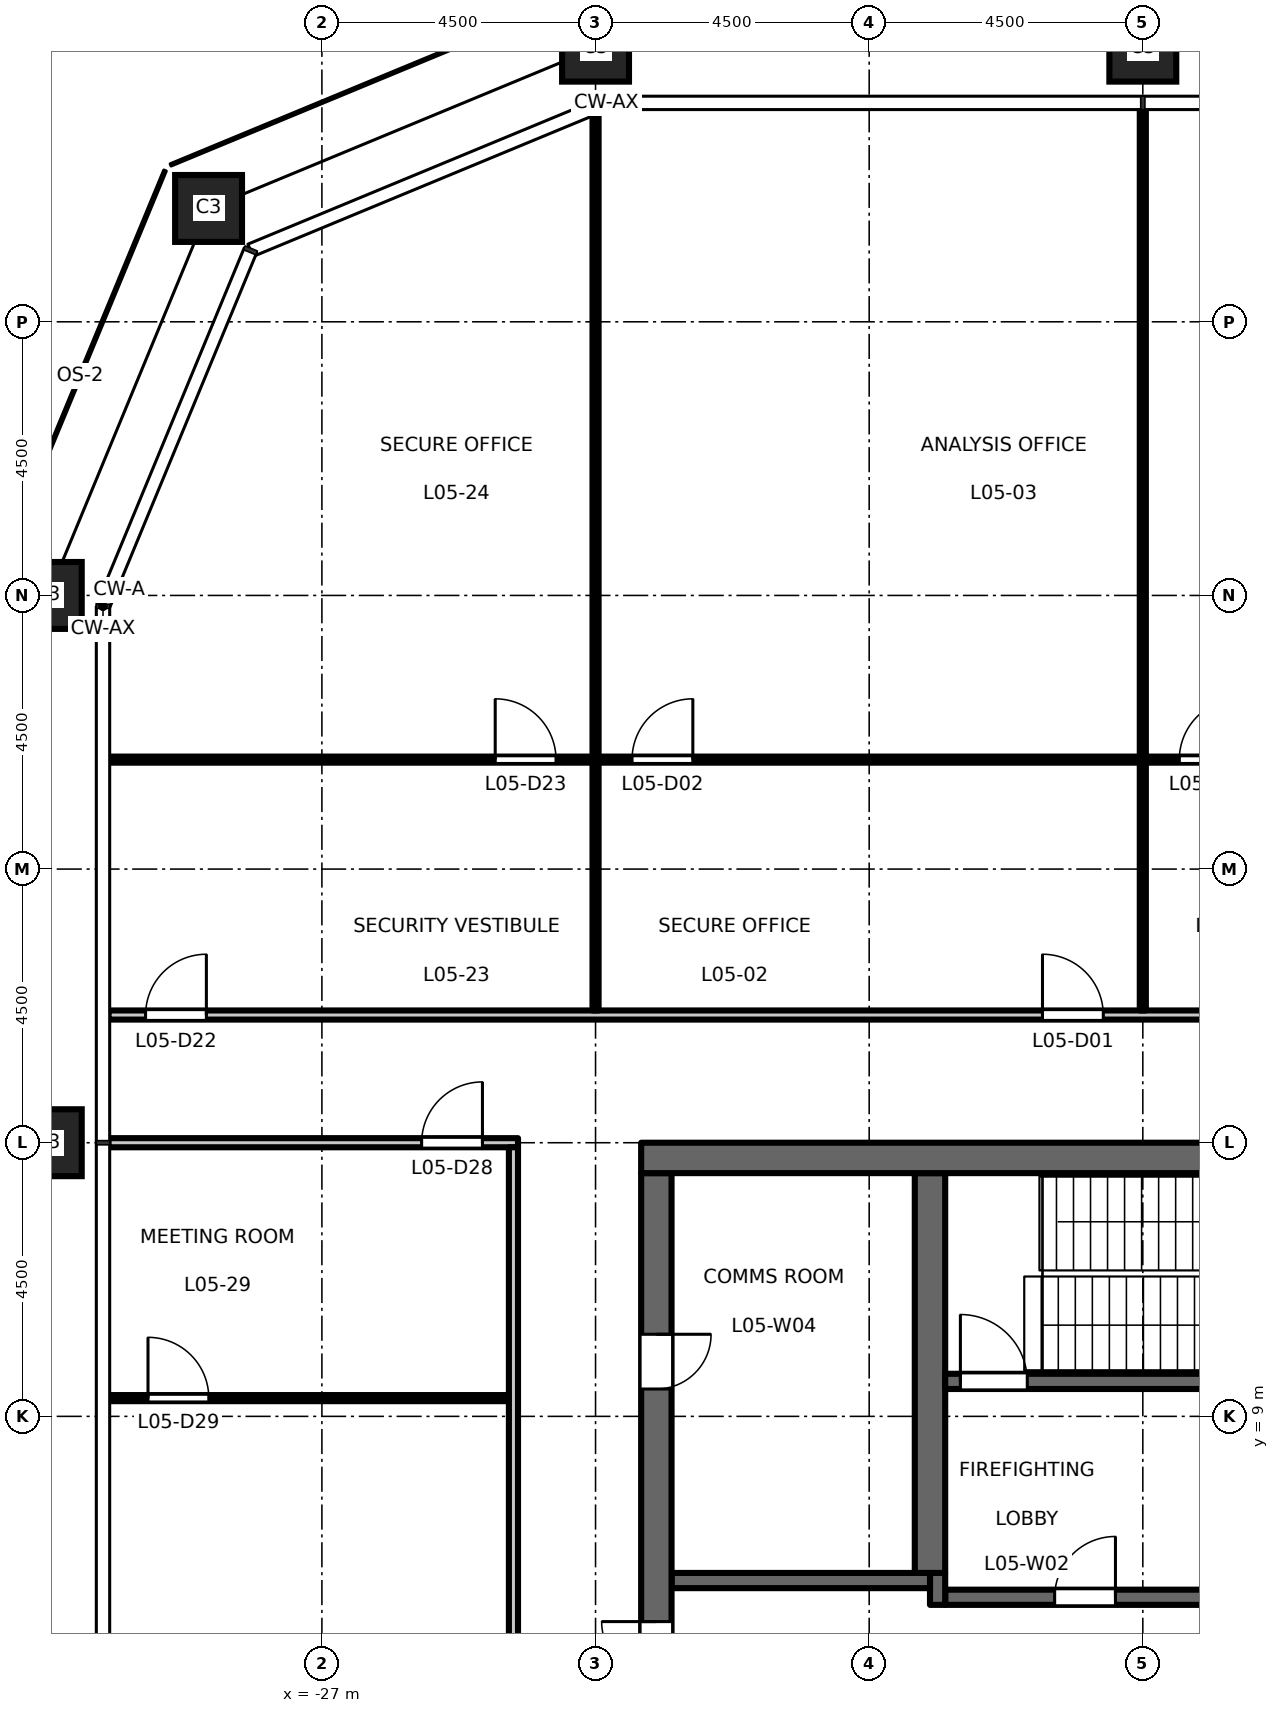
"""IFC4 building model, lengths in metres.
Left out: names, types, materials, properties, quantities, classifications, styles, units other than length and angle.
Written with IfcOpenShell. Run it as: python <this file> out.ifc"""

import sys

from ifc_helpers import new_model, si_unit, direction, frame, frame_2d, origin, origin_2d, place, context, subcontext, project, spatial, rectangle, hollow_rectangle, extrude, element, fill, save


model = new_model("IFC4")
c1 = context("Model", 3, precision=1e-05, world=origin(), true_north=direction((0.0, 1.0)))
c2 = subcontext(c1, "Body", "Model", "MODEL_VIEW")
j1 = project(units=[si_unit("LENGTHUNIT", "METRE"), si_unit("PLANEANGLEUNIT", "RADIAN")], contexts=[c1])
p1 = place(None, origin())
s1 = spatial("IfcSite", under=j1, at=p1, CompositionType="ELEMENT")
p2 = place(p1, origin())
s2 = spatial("IfcBuilding", under=s1, at=p2, CompositionType="ELEMENT")
p3 = place(p2, frame((0.0, 0.0, 26.7)))
s3 = spatial("IfcBuildingStorey", under=s2, at=p3, CompositionType="ELEMENT", Elevation=26.7)
for number, where, z_axis, x_axis in (
    (1, (-13.5, 31.5, 0.0), (0.0, 0.0, 1.0), (1.0, 0.0, 0.0)),
    (2, (-22.5, 31.5, 0.0), (0.0, 0.0, 1.0), (1.0, 0.0, 0.0)),
    (3, (-28.864, 28.864, 0.0), (0.0, 0.0, 1.0), (1.0, 0.0, 0.0)),
    (4, (-31.5, 22.5, 0.0), (0.0, 0.0, 1.0), (1.0, 0.0, 0.0)),
    (5, (-31.5, 13.5, 0.0), (0.0, 0.0, 1.0), (1.0, 0.0, 0.0)),
):
    element("IfcColumn", number, at=place(p3, frame(where, z_axis=z_axis, x_axis=x_axis)), inside=s3, PredefinedType="COLUMN", context=c2, shape_type="SweptSolid", body=[
        extrude(hollow_rectangle(XDim=1.1, YDim=1.1, WallThickness=0.07, at=origin_2d()), origin(), (0.0, 0.0, 1.0), 4.5),
    ])
p4 = place(p3, frame((-12.15, 6.025, 0.0), z_axis=(0.0, 0.0, 1.0), x_axis=(-1.0, 0.0, 0.0)))
e6 = element("IfcWall", 6, at=p4, inside=s3, PredefinedType="SHEAR", context=c2, shape_type="SweptSolid", body=[
    extrude(rectangle(XDim=4.6, YDim=0.25, at=frame_2d((2.3, 0.0))), origin(), (0.0, 0.0, 1.0), 4.35),
])
p5 = place(p4, frame((1.8, 0.0, 0.0)))
e7 = element("IfcOpeningElement", 7, at=p5, cuts=e6, PredefinedType="OPENING", context=c2, shape_type="SweptSolid", body=[
    extrude(rectangle(XDim=1.0, YDim=2.1, at=frame_2d((0.5, 1.05))), frame((0.0, 0.135, 0.0), z_axis=(0.0, -1.0, 0.0), x_axis=(1.0, 0.0, 0.0)), (0.0, 0.0, 1.0), 0.27),
])
p6 = place(p3, frame((-16.875, 5.9, 0.0), z_axis=(0.0, 0.0, 1.0), x_axis=(0.0, 1.0, 0.0)))
e8 = element("IfcWall", 8, at=p6, inside=s3, PredefinedType="SHEAR", context=c2, shape_type="SweptSolid", body=[
    extrude(rectangle(XDim=0.525, YDim=0.25, at=frame_2d((0.263, 0.0))), origin(), (0.0, 0.0, 1.0), 4.35),
])
p7 = place(p3, frame((-17.0, 6.3, 0.0), z_axis=(0.0, 0.0, 1.0), x_axis=(-1.0, 0.0, 0.0)))
e9 = element("IfcWall", 9, at=p7, inside=s3, PredefinedType="SHEAR", context=c2, shape_type="SweptSolid", body=[
    extrude(rectangle(XDim=4.25, YDim=0.25, at=frame_2d((2.125, 0.0))), origin(), (0.0, 0.0, 1.0), 4.35),
])
p8 = place(p3, frame((-21.5, -13.0, 0.0), z_axis=(0.0, 0.0, 1.0), x_axis=(0.0, 1.0, 0.0)))
e10 = element("IfcWall", 10, at=p8, inside=s3, PredefinedType="SHEAR", context=c2, shape_type="SweptSolid", body=[
    extrude(rectangle(XDim=26.0, YDim=0.5, at=frame_2d((13.0, 0.0))), origin(), (0.0, 0.0, 1.0), 4.35),
])
p9 = place(p8, frame((16.825, 0.0, 0.0)))
e11 = element("IfcOpeningElement", 11, at=p9, cuts=e10, PredefinedType="OPENING", context=c2, shape_type="SweptSolid", body=[
    extrude(rectangle(XDim=1.8, YDim=2.1, at=frame_2d((0.9, 1.05))), frame((0.0, 0.26, 0.0), z_axis=(0.0, -1.0, 0.0), x_axis=(1.0, 0.0, 0.0)), (0.0, 0.0, 1.0), 0.52),
])
p10 = place(p8, frame((7.375, 0.0, 0.0)))
e12 = element("IfcOpeningElement", 12, at=p10, cuts=e10, PredefinedType="OPENING", context=c2, shape_type="SweptSolid", body=[
    extrude(rectangle(XDim=1.8, YDim=2.1, at=frame_2d((0.9, 1.05))), frame((0.0, 0.26, 0.0), z_axis=(0.0, -1.0, 0.0), x_axis=(1.0, 0.0, 0.0)), (0.0, 0.0, 1.0), 0.52),
])
p11 = place(p8, frame((22.45, 0.0, 0.0)))
e13 = element("IfcOpeningElement", 13, at=p11, cuts=e10, PredefinedType="OPENING", context=c2, shape_type="SweptSolid", body=[
    extrude(rectangle(XDim=0.9, YDim=2.1, at=frame_2d((0.45, 1.05))), frame((0.0, 0.26, 0.0), z_axis=(0.0, -1.0, 0.0), x_axis=(1.0, 0.0, 0.0)), (0.0, 0.0, 1.0), 0.52),
])
p12 = place(p8, frame((1.7, 0.0, 0.0)))
e14 = element("IfcOpeningElement", 14, at=p12, cuts=e10, PredefinedType="OPENING", context=c2, shape_type="SweptSolid", body=[
    extrude(rectangle(XDim=0.9, YDim=2.1, at=frame_2d((0.45, 1.05))), frame((0.0, 0.26, 0.0), z_axis=(0.0, -1.0, 0.0), x_axis=(1.0, 0.0, 0.0)), (0.0, 0.0, 1.0), 0.52),
])
p13 = place(p3, frame((-17.0, 6.425, 0.0), z_axis=(0.0, 0.0, 1.0), x_axis=(0.0, 1.0, 0.0)))
e15 = element("IfcWall", 15, at=p13, inside=s3, PredefinedType="SHEAR", context=c2, shape_type="SweptSolid", body=[
    extrude(rectangle(XDim=6.575, YDim=0.5, at=frame_2d((3.288, 0.0))), origin(), (0.0, 0.0, 1.0), 4.35),
])
p14 = place(p3, frame((-8.75, 9.575, 0.0), z_axis=(0.0, 0.0, 1.0), x_axis=(-1.0, 0.0, 0.0)))
e16 = element("IfcWall", 16, at=p14, inside=s3, PredefinedType="SHEAR", context=c2, shape_type="SweptSolid", body=[
    extrude(rectangle(XDim=8.0, YDim=0.25, at=frame_2d((4.0, 0.0))), origin(), (0.0, 0.0, 1.0), 4.35),
])
p15 = place(p14, frame((6.65, 0.0, 0.0)))
e17 = element("IfcOpeningElement", 17, at=p15, cuts=e16, PredefinedType="OPENING", context=c2, shape_type="SweptSolid", body=[
    extrude(rectangle(XDim=1.1, YDim=2.1, at=frame_2d((0.55, 1.05))), frame((0.0, 0.135, 0.0), z_axis=(0.0, -1.0, 0.0), x_axis=(1.0, 0.0, 0.0)), (0.0, 0.0, 1.0), 0.27),
])
p16 = place(p3, frame((-8.25, 13.25, 0.0), z_axis=(0.0, 0.0, 1.0), x_axis=(-1.0, 0.0, 0.0)))
e18 = element("IfcWall", 18, at=p16, inside=s3, PredefinedType="SHEAR", context=c2, shape_type="SweptSolid", body=[
    extrude(rectangle(XDim=13.5, YDim=0.5, at=frame_2d((6.75, 0.0))), origin(), (0.0, 0.0, 1.0), 4.35),
])
p17 = place(p3, frame((-30.51, 9.3, 0.0), z_axis=(0.0, 0.0, 1.0), x_axis=(1.0, 0.0, 0.0)))
e19 = element("IfcWall", 19, at=p17, inside=s3, PredefinedType="PARTITIONING", context=c2, shape_type="SweptSolid", body=[
    extrude(rectangle(XDim=6.585, YDim=0.1, at=frame_2d((3.292, 0.0))), origin(), (0.0, 0.0, 1.0), 4.35),
])
p18 = place(p17, frame((0.65, 0.0, 0.0)))
e20 = element("IfcOpeningElement", 20, at=p18, cuts=e19, PredefinedType="OPENING", context=c2, shape_type="SweptSolid", body=[
    extrude(rectangle(XDim=1.0, YDim=2.1, at=frame_2d((0.5, 1.05))), frame((0.0, 0.06, 0.0), z_axis=(0.0, -1.0, 0.0), x_axis=(1.0, 0.0, 0.0)), (0.0, 0.0, 1.0), 0.12),
])
p19 = place(p3, frame((-30.51, 13.5, 0.0), z_axis=(0.0, 0.0, 1.0), x_axis=(1.0, 0.0, 0.0)))
e21 = element("IfcWall", 21, at=p19, inside=s3, PredefinedType="PARTITIONING", context=c2, shape_type="SweptSolid", body=[
    extrude(rectangle(XDim=6.735, YDim=0.15, at=frame_2d((3.368, 0.0))), origin(), (0.0, 0.0, 1.0), 3.35),
])
p20 = place(p19, frame((5.15, 0.0, 0.0)))
e22 = element("IfcOpeningElement", 22, at=p20, cuts=e21, PredefinedType="OPENING", context=c2, shape_type="SweptSolid", body=[
    extrude(rectangle(XDim=1.0, YDim=2.1, at=frame_2d((0.5, 1.05))), frame((0.0, 0.085, 0.0), z_axis=(0.0, -1.0, 0.0), x_axis=(1.0, 0.0, 0.0)), (0.0, 0.0, 1.0), 0.17),
])
p21 = place(p3, frame((-30.51, 15.6, 0.0), z_axis=(0.0, 0.0, 1.0), x_axis=(1.0, 0.0, 0.0)))
e23 = element("IfcWall", 23, at=p21, inside=s3, PredefinedType="PARTITIONING", context=c2, shape_type="SweptSolid", body=[
    extrude(rectangle(XDim=61.02, YDim=0.15, at=frame_2d((30.51, 0.0))), origin(), (0.0, 0.0, 1.0), 4.35),
])
p22 = place(p21, frame((15.36, 0.0, 0.0)))
e24 = element("IfcOpeningElement", 24, at=p22, cuts=e23, PredefinedType="OPENING", context=c2, shape_type="SweptSolid", body=[
    extrude(rectangle(XDim=1.0, YDim=2.1, at=frame_2d((0.5, 1.05))), frame((0.0, 0.085, 0.0), z_axis=(0.0, -1.0, 0.0), x_axis=(1.0, 0.0, 0.0)), (0.0, 0.0, 1.0), 0.17),
])
p23 = place(p21, frame((24.36, 0.0, 0.0)))
e25 = element("IfcOpeningElement", 25, at=p23, cuts=e23, PredefinedType="OPENING", context=c2, shape_type="SweptSolid", body=[
    extrude(rectangle(XDim=1.0, YDim=2.1, at=frame_2d((0.5, 1.05))), frame((0.0, 0.085, 0.0), z_axis=(0.0, -1.0, 0.0), x_axis=(1.0, 0.0, 0.0)), (0.0, 0.0, 1.0), 0.17),
])
p24 = place(p21, frame((28.86, 0.0, 0.0)))
e26 = element("IfcOpeningElement", 26, at=p24, cuts=e23, PredefinedType="OPENING", context=c2, shape_type="SweptSolid", body=[
    extrude(rectangle(XDim=1.0, YDim=2.1, at=frame_2d((0.5, 1.05))), frame((0.0, 0.085, 0.0), z_axis=(0.0, -1.0, 0.0), x_axis=(1.0, 0.0, 0.0)), (0.0, 0.0, 1.0), 0.17),
])
p25 = place(p21, frame((31.11, 0.0, 0.0)))
e27 = element("IfcOpeningElement", 27, at=p25, cuts=e23, PredefinedType="OPENING", context=c2, shape_type="SweptSolid", body=[
    extrude(rectangle(XDim=1.0, YDim=2.1, at=frame_2d((0.5, 1.05))), frame((0.0, 0.085, 0.0), z_axis=(0.0, -1.0, 0.0), x_axis=(1.0, 0.0, 0.0)), (0.0, 0.0, 1.0), 0.17),
])
p26 = place(p21, frame((35.61, 0.0, 0.0)))
e28 = element("IfcOpeningElement", 28, at=p26, cuts=e23, PredefinedType="OPENING", context=c2, shape_type="SweptSolid", body=[
    extrude(rectangle(XDim=1.0, YDim=2.1, at=frame_2d((0.5, 1.05))), frame((0.0, 0.085, 0.0), z_axis=(0.0, -1.0, 0.0), x_axis=(1.0, 0.0, 0.0)), (0.0, 0.0, 1.0), 0.17),
])
p27 = place(p21, frame((44.61, 0.0, 0.0)))
e29 = element("IfcOpeningElement", 29, at=p27, cuts=e23, PredefinedType="OPENING", context=c2, shape_type="SweptSolid", body=[
    extrude(rectangle(XDim=1.0, YDim=2.1, at=frame_2d((0.5, 1.05))), frame((0.0, 0.085, 0.0), z_axis=(0.0, -1.0, 0.0), x_axis=(1.0, 0.0, 0.0)), (0.0, 0.0, 1.0), 0.17),
])
p28 = place(p21, frame((0.61, 0.0, 0.0)))
e30 = element("IfcOpeningElement", 30, at=p28, cuts=e23, PredefinedType="OPENING", context=c2, shape_type="SweptSolid", body=[
    extrude(rectangle(XDim=1.0, YDim=2.1, at=frame_2d((0.5, 1.05))), frame((0.0, 0.085, 0.0), z_axis=(0.0, -1.0, 0.0), x_axis=(1.0, 0.0, 0.0)), (0.0, 0.0, 1.0), 0.17),
])
p29 = place(p21, frame((53.62, 0.0, 0.0)))
e31 = element("IfcOpeningElement", 31, at=p29, cuts=e23, PredefinedType="OPENING", context=c2, shape_type="SweptSolid", body=[
    extrude(rectangle(XDim=1.0, YDim=2.1, at=frame_2d((0.5, 1.05))), frame((0.0, 0.085, 0.0), z_axis=(0.0, -1.0, 0.0), x_axis=(1.0, 0.0, 0.0)), (0.0, 0.0, 1.0), 0.17),
])
p30 = place(p3, frame((-30.51, 19.8, 0.0), z_axis=(0.0, 0.0, 1.0), x_axis=(1.0, 0.0, 0.0)))
e32 = element("IfcWall", 32, at=p30, inside=s3, PredefinedType="PARTITIONING", context=c2, shape_type="SweptSolid", body=[
    extrude(rectangle(XDim=52.96, YDim=0.1, at=frame_2d((26.48, 0.0))), origin(), (0.0, 0.0, 1.0), 4.35),
])
p31 = place(p30, frame((8.61, 0.0, 0.0)))
e33 = element("IfcOpeningElement", 33, at=p31, cuts=e32, PredefinedType="OPENING", context=c2, shape_type="SweptSolid", body=[
    extrude(rectangle(XDim=1.0, YDim=2.1, at=frame_2d((0.5, 1.05))), frame((0.0, 0.06, 0.0), z_axis=(0.0, -1.0, 0.0), x_axis=(1.0, 0.0, 0.0)), (0.0, 0.0, 1.0), 0.12),
])
p32 = place(p30, frame((17.61, 0.0, 0.0)))
e34 = element("IfcOpeningElement", 34, at=p32, cuts=e32, PredefinedType="OPENING", context=c2, shape_type="SweptSolid", body=[
    extrude(rectangle(XDim=1.0, YDim=2.1, at=frame_2d((0.5, 1.05))), frame((0.0, 0.06, 0.0), z_axis=(0.0, -1.0, 0.0), x_axis=(1.0, 0.0, 0.0)), (0.0, 0.0, 1.0), 0.12),
])
p33 = place(p30, frame((28.86, 0.0, 0.0)))
e35 = element("IfcOpeningElement", 35, at=p33, cuts=e32, PredefinedType="OPENING", context=c2, shape_type="SweptSolid", body=[
    extrude(rectangle(XDim=1.0, YDim=2.1, at=frame_2d((0.5, 1.05))), frame((0.0, 0.06, 0.0), z_axis=(0.0, -1.0, 0.0), x_axis=(1.0, 0.0, 0.0)), (0.0, 0.0, 1.0), 0.12),
])
p34 = place(p30, frame((42.36, 0.0, 0.0)))
e36 = element("IfcOpeningElement", 36, at=p34, cuts=e32, PredefinedType="OPENING", context=c2, shape_type="SweptSolid", body=[
    extrude(rectangle(XDim=1.0, YDim=2.1, at=frame_2d((0.5, 1.05))), frame((0.0, 0.06, 0.0), z_axis=(0.0, -1.0, 0.0), x_axis=(1.0, 0.0, 0.0)), (0.0, 0.0, 1.0), 0.12),
])
p35 = place(p30, frame((51.36, 0.0, 0.0)))
e37 = element("IfcOpeningElement", 37, at=p35, cuts=e32, PredefinedType="OPENING", context=c2, shape_type="SweptSolid", body=[
    extrude(rectangle(XDim=1.0, YDim=2.1, at=frame_2d((0.5, 1.05))), frame((0.0, 0.06, 0.0), z_axis=(0.0, -1.0, 0.0), x_axis=(1.0, 0.0, 0.0)), (0.0, 0.0, 1.0), 0.12),
])
p36 = place(p30, frame((6.36, 0.0, 0.0)))
e38 = element("IfcOpeningElement", 38, at=p36, cuts=e32, PredefinedType="OPENING", context=c2, shape_type="SweptSolid", body=[
    extrude(rectangle(XDim=1.0, YDim=2.1, at=frame_2d((0.5, 1.05))), frame((0.0, 0.06, 0.0), z_axis=(0.0, -1.0, 0.0), x_axis=(1.0, 0.0, 0.0)), (0.0, 0.0, 1.0), 0.12),
])
p37 = place(p3, frame((-23.85, -13.425, 0.0), z_axis=(0.0, 0.0, 1.0), x_axis=(0.0, 1.0, 0.0)))
e39 = element("IfcWall", 39, at=p37, inside=s3, PredefinedType="PARTITIONING", context=c2, shape_type="SweptSolid", body=[
    extrude(rectangle(XDim=26.85, YDim=0.15, at=frame_2d((13.425, 0.0))), origin(), (0.0, 0.0, 1.0), 4.35),
])
p38 = place(p3, frame((-22.5, 15.675, 0.0), z_axis=(0.0, 0.0, 1.0), x_axis=(0.0, 1.0, 0.0)))
e40 = element("IfcWall", 40, at=p38, inside=s3, PredefinedType="PARTITIONING", context=c2, shape_type="SweptSolid", body=[
    extrude(rectangle(XDim=4.075, YDim=0.1, at=frame_2d((2.038, 0.0))), origin(), (0.0, 0.0, 1.0), 3.35),
])
p39 = place(p3, frame((-22.5, 19.85, 0.0), z_axis=(0.0, 0.0, 1.0), x_axis=(0.0, 1.0, 0.0)))
e41 = element("IfcWall", 41, at=p39, inside=s3, PredefinedType="PARTITIONING", context=c2, shape_type="SweptSolid", body=[
    extrude(rectangle(XDim=10.578, YDim=0.1, at=frame_2d((5.289, 0.0))), origin(), (0.0, 0.0, 1.0), 3.35),
])
p40 = place(p3, frame((-13.5, 15.675, 0.0), z_axis=(0.0, 0.0, 1.0), x_axis=(0.0, 1.0, 0.0)))
e42 = element("IfcWall", 42, at=p40, inside=s3, PredefinedType="PARTITIONING", context=c2, shape_type="SweptSolid", body=[
    extrude(rectangle(XDim=4.075, YDim=0.1, at=frame_2d((2.038, 0.0))), origin(), (0.0, 0.0, 1.0), 3.35),
])
p41 = place(p3, frame((-13.5, 19.85, 0.0), z_axis=(0.0, 0.0, 1.0), x_axis=(0.0, 1.0, 0.0)))
e43 = element("IfcWall", 43, at=p41, inside=s3, PredefinedType="PARTITIONING", context=c2, shape_type="SweptSolid", body=[
    extrude(rectangle(XDim=10.66, YDim=0.1, at=frame_2d((5.33, 0.0))), origin(), (0.0, 0.0, 1.0), 3.35),
])
p42 = place(p5, origin())
e44 = element("IfcDoor", 44, at=p42, inside=s3, OperationType="SINGLE_SWING_LEFT", PredefinedType="DOOR", context=c2, shape_type="SweptSolid", body=[
    extrude(rectangle(XDim=1.0, YDim=2.1, at=frame_2d((0.5, 1.05))), frame((0.0, 0.025, 0.0), z_axis=(0.0, -1.0, 0.0), x_axis=(1.0, 0.0, 0.0)), (0.0, 0.0, 1.0), 0.05),
])
fill(e7, e44)
p43 = place(p15, origin())
e45 = element("IfcDoor", 45, at=p43, inside=s3, OperationType="SINGLE_SWING_RIGHT", PredefinedType="DOOR", context=c2, shape_type="SweptSolid", body=[
    extrude(rectangle(XDim=1.1, YDim=2.1, at=frame_2d((0.55, 1.05))), frame((0.0, 0.025, 0.0), z_axis=(0.0, -1.0, 0.0), x_axis=(1.0, 0.0, 0.0)), (0.0, 0.0, 1.0), 0.05),
])
fill(e17, e45)
p44 = place(p9, origin())
e46 = element("IfcDoor", 46, at=p44, inside=s3, OperationType="DOUBLE_DOOR_DOUBLE_SWING", PredefinedType="DOOR", context=c2, shape_type="SweptSolid", body=[
    extrude(rectangle(XDim=1.8, YDim=2.1, at=frame_2d((0.9, 1.05))), frame((0.0, 0.025, 0.0), z_axis=(0.0, -1.0, 0.0), x_axis=(1.0, 0.0, 0.0)), (0.0, 0.0, 1.0), 0.05),
])
fill(e11, e46)
p45 = place(p11, origin())
e47 = element("IfcDoor", 47, at=p45, inside=s3, OperationType="SINGLE_SWING_RIGHT", PredefinedType="DOOR", context=c2, shape_type="SweptSolid", body=[
    extrude(rectangle(XDim=0.9, YDim=2.1, at=frame_2d((0.45, 1.05))), frame((0.0, 0.025, 0.0), z_axis=(0.0, -1.0, 0.0), x_axis=(1.0, 0.0, 0.0)), (0.0, 0.0, 1.0), 0.05),
])
fill(e13, e47)
p46 = place(p22, origin())
e48 = element("IfcDoor", 48, at=p46, inside=s3, OperationType="SINGLE_SWING_LEFT", PredefinedType="DOOR", context=c2, shape_type="SweptSolid", body=[
    extrude(rectangle(XDim=1.0, YDim=2.1, at=frame_2d((0.5, 1.05))), frame((0.0, 0.025, 0.0), z_axis=(0.0, -1.0, 0.0), x_axis=(1.0, 0.0, 0.0)), (0.0, 0.0, 1.0), 0.05),
])
fill(e24, e48)
p47 = place(p31, origin())
e49 = element("IfcDoor", 49, at=p47, inside=s3, OperationType="SINGLE_SWING_RIGHT", PredefinedType="DOOR", context=c2, shape_type="SweptSolid", body=[
    extrude(rectangle(XDim=1.0, YDim=2.1, at=frame_2d((0.5, 1.05))), frame((0.0, 0.025, 0.0), z_axis=(0.0, -1.0, 0.0), x_axis=(1.0, 0.0, 0.0)), (0.0, 0.0, 1.0), 0.05),
])
fill(e33, e49)
p48 = place(p32, origin())
e50 = element("IfcDoor", 50, at=p48, inside=s3, OperationType="SINGLE_SWING_RIGHT", PredefinedType="DOOR", context=c2, shape_type="SweptSolid", body=[
    extrude(rectangle(XDim=1.0, YDim=2.1, at=frame_2d((0.5, 1.05))), frame((0.0, 0.025, 0.0), z_axis=(0.0, -1.0, 0.0), x_axis=(1.0, 0.0, 0.0)), (0.0, 0.0, 1.0), 0.05),
])
fill(e34, e50)
p49 = place(p28, origin())
e51 = element("IfcDoor", 51, at=p49, inside=s3, OperationType="SINGLE_SWING_RIGHT", PredefinedType="DOOR", context=c2, shape_type="SweptSolid", body=[
    extrude(rectangle(XDim=1.0, YDim=2.1, at=frame_2d((0.5, 1.05))), frame((0.0, 0.025, 0.0), z_axis=(0.0, -1.0, 0.0), x_axis=(1.0, 0.0, 0.0)), (0.0, 0.0, 1.0), 0.05),
])
fill(e30, e51)
p50 = place(p36, origin())
e52 = element("IfcDoor", 52, at=p50, inside=s3, OperationType="SINGLE_SWING_LEFT", PredefinedType="DOOR", context=c2, shape_type="SweptSolid", body=[
    extrude(rectangle(XDim=1.0, YDim=2.1, at=frame_2d((0.5, 1.05))), frame((0.0, 0.025, 0.0), z_axis=(0.0, -1.0, 0.0), x_axis=(1.0, 0.0, 0.0)), (0.0, 0.0, 1.0), 0.05),
])
fill(e38, e52)
p51 = place(p20, origin())
e53 = element("IfcDoor", 53, at=p51, inside=s3, OperationType="SINGLE_SWING_RIGHT", PredefinedType="DOOR", context=c2, shape_type="SweptSolid", body=[
    extrude(rectangle(XDim=1.0, YDim=2.1, at=frame_2d((0.5, 1.05))), frame((0.0, 0.025, 0.0), z_axis=(0.0, -1.0, 0.0), x_axis=(1.0, 0.0, 0.0)), (0.0, 0.0, 1.0), 0.05),
])
fill(e22, e53)
p52 = place(p18, origin())
e54 = element("IfcDoor", 54, at=p52, inside=s3, OperationType="SINGLE_SWING_LEFT", PredefinedType="DOOR", context=c2, shape_type="SweptSolid", body=[
    extrude(rectangle(XDim=1.0, YDim=2.1, at=frame_2d((0.5, 1.05))), frame((0.0, 0.025, 0.0), z_axis=(0.0, -1.0, 0.0), x_axis=(1.0, 0.0, 0.0)), (0.0, 0.0, 1.0), 0.05),
])
fill(e20, e54)
save(model, sys.argv[1])
